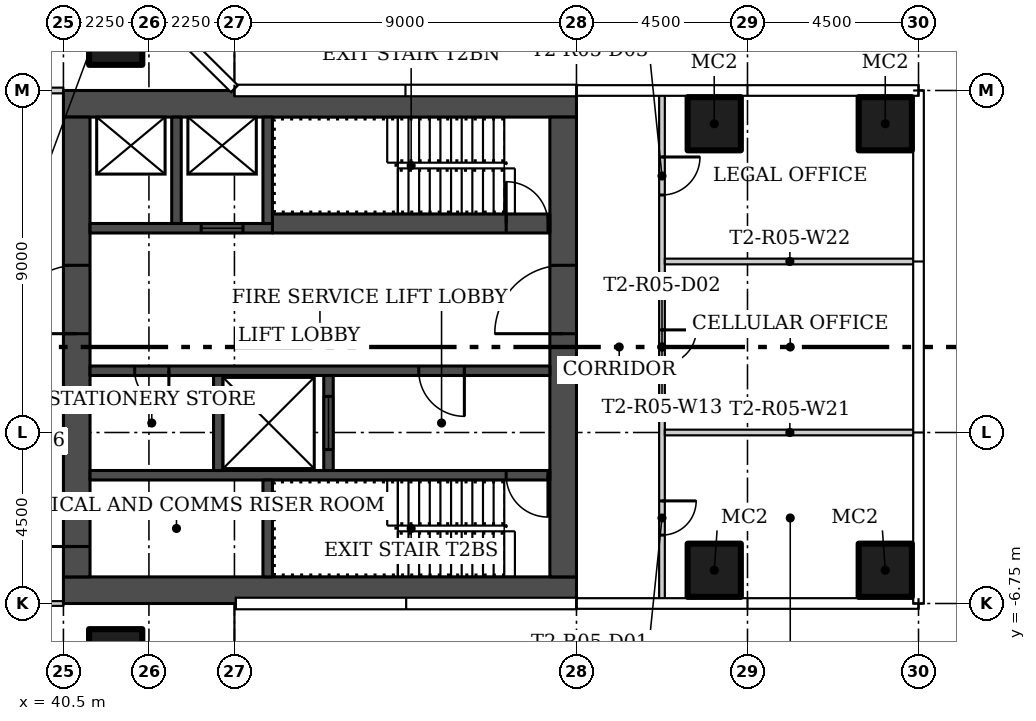
"""IFC4 building model, lengths in metres.
Left out: names, types, materials, properties, quantities, classifications, styles, units other than length and angle.
Written with IfcOpenShell. Run it as: python <this file> out.ifc"""

import sys

from ifc_helpers import new_model, si_unit, direction, frame, frame_2d, origin, origin_2d, place, context, subcontext, project, spatial, rectangle, hollow_rectangle, extrude, element, fill, save


model = new_model("IFC4")
c1 = context("Model", 3, precision=1e-05, world=origin(), true_north=direction((0.0, 1.0)))
c2 = subcontext(c1, "Body", "Model", "MODEL_VIEW")
j1 = project(units=[si_unit("LENGTHUNIT", "METRE"), si_unit("PLANEANGLEUNIT", "RADIAN")], contexts=[c1])
p1 = place(None, origin())
s1 = spatial("IfcSite", under=j1, at=p1, CompositionType="ELEMENT")
p2 = place(p1, origin())
s2 = spatial("IfcBuilding", under=s1, at=p2, CompositionType="ELEMENT")
p3 = place(p2, frame((0.0, 0.0, 57.6)))
s3 = spatial("IfcBuildingStorey", under=s2, at=p3, CompositionType="ELEMENT", Elevation=57.6)
for number, where in (
    (1, (41.875, 8.125, 0.0)),
    (2, (41.875, -8.125, 0.0)),
    (3, (57.625, -5.875, 0.0)),
    (4, (62.125, -5.875, 0.0)),
    (5, (57.625, 5.875, 0.0)),
    (6, (62.125, 5.875, 0.0)),
):
    element("IfcColumn", number, at=place(p3, frame(where)), inside=s3, PredefinedType="COLUMN", context=c2, shape_type="SweptSolid", body=[
        extrude(hollow_rectangle(XDim=1.4, YDim=1.4, WallThickness=0.05, at=origin_2d()), origin(), (0.0, 0.0, 1.0), 3.55),
    ])
p4 = place(p3, frame((35.9, 6.75, 0.0)))
e7 = element("IfcWall", 7, at=p4, inside=s3, PredefinedType="PARTITIONING", context=c2, shape_type="SweptSolid", body=[
    extrude(rectangle(XDim=4.6, YDim=0.15, at=frame_2d((2.3, 0.0))), origin(), (0.0, 0.0, 1.0), 3.55),
])
p5 = place(p4, frame((1.85, 0.0, 0.0)))
e8 = element("IfcOpeningElement", 8, at=p5, cuts=e7, PredefinedType="OPENING", context=c2, shape_type="SweptSolid", body=[
    extrude(rectangle(XDim=1.0, YDim=2.4, at=frame_2d((0.5, 1.2))), frame((0.0, 0.085, 0.0), z_axis=(0.0, -1.0, 0.0), x_axis=(1.0, 0.0, 0.0)), (0.0, 0.0, 1.0), 0.17),
])
p6 = place(p3, frame((40.5, -6.75, 0.0), z_axis=(0.0, 0.0, 1.0), x_axis=(-1.0, 0.0, 0.0)))
e9 = element("IfcWall", 9, at=p6, inside=s3, PredefinedType="PARTITIONING", context=c2, shape_type="SweptSolid", body=[
    extrude(rectangle(XDim=4.575, YDim=0.125, at=frame_2d((2.288, 0.0))), origin(), (0.0, 0.0, 1.0), 3.55),
])
p7 = place(p6, frame((1.5, 0.0, 0.0)))
e10 = element("IfcOpeningElement", 10, at=p7, cuts=e9, PredefinedType="OPENING", context=c2, shape_type="SweptSolid", body=[
    extrude(rectangle(XDim=1.5, YDim=2.1, at=frame_2d((0.75, 1.05))), frame((0.0, 0.073, 0.0), z_axis=(0.0, -1.0, 0.0), x_axis=(1.0, 0.0, 0.0)), (0.0, 0.0, 1.0), 0.145),
])
p8 = place(p3, frame((56.25, 6.655, 0.0), z_axis=(0.0, 0.0, 1.0), x_axis=(0.0, -1.0, 0.0)))
e11 = element("IfcWall", 11, at=p8, inside=s3, PredefinedType="PARTITIONING", context=c2, shape_type="SweptSolid", body=[
    extrude(rectangle(XDim=13.31, YDim=0.15, at=frame_2d((6.655, 0.0))), origin(), (0.0, 0.0, 1.0), 3.55),
])
p9 = place(p8, frame((10.705, 0.0, 0.0)))
e12 = element("IfcOpeningElement", 12, at=p9, cuts=e11, PredefinedType="OPENING", context=c2, shape_type="SweptSolid", body=[
    extrude(rectangle(XDim=0.9, YDim=2.1, at=frame_2d((0.45, 1.05))), frame((0.0, 0.085, 0.0), z_axis=(0.0, -1.0, 0.0), x_axis=(1.0, 0.0, 0.0)), (0.0, 0.0, 1.0), 0.17),
])
p10 = place(p8, frame((6.205, 0.0, 0.0)))
e13 = element("IfcOpeningElement", 13, at=p10, cuts=e11, PredefinedType="OPENING", context=c2, shape_type="SweptSolid", body=[
    extrude(rectangle(XDim=0.9, YDim=2.1, at=frame_2d((0.45, 1.05))), frame((0.0, 0.085, 0.0), z_axis=(0.0, -1.0, 0.0), x_axis=(1.0, 0.0, 0.0)), (0.0, 0.0, 1.0), 0.17),
])
p11 = place(p8, frame((1.655, 0.0, 0.0)))
e14 = element("IfcOpeningElement", 14, at=p11, cuts=e11, PredefinedType="OPENING", context=c2, shape_type="SweptSolid", body=[
    extrude(rectangle(XDim=1.0, YDim=2.4, at=frame_2d((0.5, 1.2))), frame((0.0, 0.085, 0.0), z_axis=(0.0, -1.0, 0.0), x_axis=(1.0, 0.0, 0.0)), (0.0, 0.0, 1.0), 0.17),
])
for number, where, z_axis, x_axis in (
    (15, (62.905, -2.25, 0.0), (0.0, 0.0, 1.0), (-1.0, 0.0, 0.0)),
    (16, (62.905, 2.25, 0.0), (0.0, 0.0, 1.0), (-1.0, 0.0, 0.0)),
):
    element("IfcWall", number, at=place(p3, frame(where, z_axis=z_axis, x_axis=x_axis)), inside=s3, PredefinedType="PARTITIONING", context=c2, shape_type="SweptSolid", body=[
        extrude(rectangle(XDim=6.58, YDim=0.15, at=frame_2d((3.29, 0.0))), origin(), (0.0, 0.0, 1.0), 3.55),
    ])
for number, where, z_axis, x_axis in (
    (17, (54.0, -6.4, 0.0), (0.0, 0.0, 1.0), (-1.0, 0.0, 0.0)),
    (18, (54.0, 6.4, 0.0), (0.0, 0.0, 1.0), (-1.0, 0.0, 0.0)),
):
    element("IfcWall", number, at=place(p3, frame(where, z_axis=z_axis, x_axis=x_axis)), inside=s3, PredefinedType="SHEAR", context=c2, shape_type="SweptSolid", body=[
        extrude(rectangle(XDim=13.5, YDim=0.7, at=frame_2d((6.75, 0.0))), origin(), (0.0, 0.0, 1.0), 3.55),
    ])
p12 = place(p3, frame((53.65, -6.05, 0.0), z_axis=(0.0, 0.0, 1.0), x_axis=(0.0, 1.0, 0.0)))
e19 = element("IfcWall", 19, at=p12, inside=s3, PredefinedType="SHEAR", context=c2, shape_type="SweptSolid", body=[
    extrude(rectangle(XDim=12.1, YDim=0.7, at=frame_2d((6.05, 0.0))), origin(), (0.0, 0.0, 1.0), 3.55),
])
p13 = place(p12, frame((6.4, 0.0, 0.0)))
e20 = element("IfcOpeningElement", 20, at=p13, cuts=e19, PredefinedType="OPENING", context=c2, shape_type="SweptSolid", body=[
    extrude(rectangle(XDim=1.8, YDim=2.4, at=frame_2d((0.9, 1.2))), frame((0.0, 0.36, 0.0), z_axis=(0.0, -1.0, 0.0), x_axis=(1.0, 0.0, 0.0)), (0.0, 0.0, 1.0), 0.72),
])
p14 = place(p3, frame((40.85, -6.05, 0.0), z_axis=(0.0, 0.0, 1.0), x_axis=(0.0, 1.0, 0.0)))
e21 = element("IfcWall", 21, at=p14, inside=s3, PredefinedType="SHEAR", context=c2, shape_type="SweptSolid", body=[
    extrude(rectangle(XDim=12.1, YDim=0.7, at=frame_2d((6.05, 0.0))), origin(), (0.0, 0.0, 1.0), 3.55),
])
p15 = place(p14, frame((0.8, 0.0, 0.0)))
e22 = element("IfcOpeningElement", 22, at=p15, cuts=e21, PredefinedType="OPENING", context=c2, shape_type="SweptSolid", body=[
    extrude(rectangle(XDim=1.2, YDim=2.1, at=frame_2d((0.6, 1.05))), frame((0.0, 0.36, 0.0), z_axis=(0.0, -1.0, 0.0), x_axis=(1.0, 0.0, 0.0)), (0.0, 0.0, 1.0), 0.72),
])
p16 = place(p14, frame((6.4, 0.0, 0.0)))
e23 = element("IfcOpeningElement", 23, at=p16, cuts=e21, PredefinedType="OPENING", context=c2, shape_type="SweptSolid", body=[
    extrude(rectangle(XDim=1.8, YDim=2.4, at=frame_2d((0.9, 1.2))), frame((0.0, 0.36, 0.0), z_axis=(0.0, -1.0, 0.0), x_axis=(1.0, 0.0, 0.0)), (0.0, 0.0, 1.0), 0.72),
])
p17 = place(p3, frame((53.3, -3.375, 0.0), z_axis=(0.0, 0.0, 1.0), x_axis=(-1.0, 0.0, 0.0)))
e24 = element("IfcWall", 24, at=p17, inside=s3, PredefinedType="SHEAR", context=c2, shape_type="SweptSolid", body=[
    extrude(rectangle(XDim=12.1, YDim=0.25, at=frame_2d((6.05, 0.0))), origin(), (0.0, 0.0, 1.0), 3.55),
])
p18 = place(p17, frame((0.05, 0.0, 0.0)))
e25 = element("IfcOpeningElement", 25, at=p18, cuts=e24, PredefinedType="OPENING", context=c2, shape_type="SweptSolid", body=[
    extrude(rectangle(XDim=1.1, YDim=2.1, at=frame_2d((0.55, 1.05))), frame((0.0, 0.135, 0.0), z_axis=(0.0, -1.0, 0.0), x_axis=(1.0, 0.0, 0.0)), (0.0, 0.0, 1.0), 0.27),
])
p19 = place(p3, frame((45.875, -6.05, 0.0), z_axis=(0.0, 0.0, 1.0), x_axis=(0.0, 1.0, 0.0)))
e26 = element("IfcWall", 26, at=p19, inside=s3, PredefinedType="SHEAR", context=c2, shape_type="SweptSolid", body=[
    extrude(rectangle(XDim=2.55, YDim=0.25, at=frame_2d((1.275, 0.0))), origin(), (0.0, 0.0, 1.0), 3.55),
])
p20 = place(p3, frame((53.3, -0.625, 0.0), z_axis=(0.0, 0.0, 1.0), x_axis=(-1.0, 0.0, 0.0)))
e27 = element("IfcWall", 27, at=p20, inside=s3, PredefinedType="SHEAR", context=c2, shape_type="SweptSolid", body=[
    extrude(rectangle(XDim=12.1, YDim=0.25, at=frame_2d((6.05, 0.0))), origin(), (0.0, 0.0, 1.0), 3.55),
])
p21 = place(p20, frame((2.25, 0.0, 0.0)))
e28 = element("IfcOpeningElement", 28, at=p21, cuts=e27, PredefinedType="OPENING", context=c2, shape_type="SweptSolid", body=[
    extrude(rectangle(XDim=1.2, YDim=2.1, at=frame_2d((0.6, 1.05))), frame((0.0, 0.135, 0.0), z_axis=(0.0, -1.0, 0.0), x_axis=(1.0, 0.0, 0.0)), (0.0, 0.0, 1.0), 0.27),
])
p22 = place(p20, frame((10.025, 0.0, 0.0)))
e29 = element("IfcOpeningElement", 29, at=p22, cuts=e27, PredefinedType="OPENING", context=c2, shape_type="SweptSolid", body=[
    extrude(rectangle(XDim=0.9, YDim=2.1, at=frame_2d((0.45, 1.05))), frame((0.0, 0.135, 0.0), z_axis=(0.0, -1.0, 0.0), x_axis=(1.0, 0.0, 0.0)), (0.0, 0.0, 1.0), 0.27),
])
p23 = place(p3, frame((47.475, -3.25, 0.0), z_axis=(0.0, 0.0, 1.0), x_axis=(0.0, 1.0, 0.0)))
e30 = element("IfcWall", 30, at=p23, inside=s3, PredefinedType="SHEAR", context=c2, shape_type="SweptSolid", body=[
    extrude(rectangle(XDim=2.5, YDim=0.25, at=frame_2d((1.25, 0.0))), origin(), (0.0, 0.0, 1.0), 3.55),
])
p24 = place(p23, frame((0.55, 0.0, 0.0)))
e31 = element("IfcOpeningElement", 31, at=p24, cuts=e30, PredefinedType="OPENING", context=c2, shape_type="SweptSolid", body=[
    extrude(rectangle(XDim=1.4, YDim=2.4, at=frame_2d((0.7, 1.2))), frame((0.0, 0.135, 0.0), z_axis=(0.0, -1.0, 0.0), x_axis=(1.0, 0.0, 0.0)), (0.0, 0.0, 1.0), 0.27),
])
p25 = place(p3, frame((44.575, -3.25, 0.0), z_axis=(0.0, 0.0, 1.0), x_axis=(0.0, 1.0, 0.0)))
e32 = element("IfcWall", 32, at=p25, inside=s3, PredefinedType="SHEAR", context=c2, shape_type="SweptSolid", body=[
    extrude(rectangle(XDim=2.5, YDim=0.25, at=frame_2d((1.25, 0.0))), origin(), (0.0, 0.0, 1.0), 3.55),
])
p26 = place(p3, frame((46.0, 3.25, 0.0)))
e33 = element("IfcWall", 33, at=p26, inside=s3, PredefinedType="SHEAR", context=c2, shape_type="SweptSolid", body=[
    extrude(rectangle(XDim=7.3, YDim=0.5, at=frame_2d((3.65, 0.0))), origin(), (0.0, 0.0, 1.0), 3.55),
])
p27 = place(p26, frame((6.15, 0.0, 0.0)))
e34 = element("IfcOpeningElement", 34, at=p27, cuts=e33, PredefinedType="OPENING", context=c2, shape_type="SweptSolid", body=[
    extrude(rectangle(XDim=1.1, YDim=2.1, at=frame_2d((0.55, 1.05))), frame((0.0, 0.26, 0.0), z_axis=(0.0, -1.0, 0.0), x_axis=(1.0, 0.0, 0.0)), (0.0, 0.0, 1.0), 0.52),
])
p28 = place(p3, frame((46.0, 3.125, 0.0), z_axis=(0.0, 0.0, 1.0), x_axis=(-1.0, 0.0, 0.0)))
e35 = element("IfcWall", 35, at=p28, inside=s3, PredefinedType="SHEAR", context=c2, shape_type="SweptSolid", body=[
    extrude(rectangle(XDim=4.8, YDim=0.25, at=frame_2d((2.4, 0.0))), origin(), (0.0, 0.0, 1.0), 3.55),
])
p29 = place(p28, frame((0.775, 0.0, 0.0)))
e36 = element("IfcOpeningElement", 36, at=p29, cuts=e35, PredefinedType="OPENING", context=c2, shape_type="SweptSolid", body=[
    extrude(rectangle(XDim=1.1, YDim=2.1, at=frame_2d((0.55, 1.05))), frame((0.0, 0.135, 0.0), z_axis=(0.0, -1.0, 0.0), x_axis=(1.0, 0.0, 0.0)), (0.0, 0.0, 1.0), 0.27),
])
for number, where, z_axis, x_axis in (
    (37, (45.875, 3.25, 0.0), (0.0, 0.0, 1.0), (0.0, 1.0, 0.0)),
    (38, (43.475, 3.25, 0.0), (0.0, 0.0, 1.0), (0.0, 1.0, 0.0)),
):
    element("IfcWall", number, at=place(p3, frame(where, z_axis=z_axis, x_axis=x_axis)), inside=s3, PredefinedType="SHEAR", context=c2, shape_type="SweptSolid", body=[
        extrude(rectangle(XDim=2.8, YDim=0.25, at=frame_2d((1.4, 0.0))), origin(), (0.0, 0.0, 1.0), 3.55),
    ])
p30 = place(p9, origin())
e39 = element("IfcDoor", 39, at=p30, inside=s3, OperationType="SINGLE_SWING_LEFT", PredefinedType="DOOR", context=c2, shape_type="SweptSolid", body=[
    extrude(rectangle(XDim=0.9, YDim=2.1, at=frame_2d((0.45, 1.05))), frame((0.0, 0.025, 0.0), z_axis=(0.0, -1.0, 0.0), x_axis=(1.0, 0.0, 0.0)), (0.0, 0.0, 1.0), 0.05),
])
fill(e12, e39)
p31 = place(p10, origin())
e40 = element("IfcDoor", 40, at=p31, inside=s3, OperationType="SINGLE_SWING_RIGHT", PredefinedType="DOOR", context=c2, shape_type="SweptSolid", body=[
    extrude(rectangle(XDim=0.9, YDim=2.1, at=frame_2d((0.45, 1.05))), frame((0.0, 0.025, 0.0), z_axis=(0.0, -1.0, 0.0), x_axis=(1.0, 0.0, 0.0)), (0.0, 0.0, 1.0), 0.05),
])
fill(e13, e40)
p32 = place(p11, origin())
e41 = element("IfcDoor", 41, at=p32, inside=s3, OperationType="SINGLE_SWING_RIGHT", PredefinedType="DOOR", context=c2, shape_type="SweptSolid", body=[
    extrude(rectangle(XDim=1.0, YDim=2.4, at=frame_2d((0.5, 1.2))), frame((0.0, 0.025, 0.0), z_axis=(0.0, -1.0, 0.0), x_axis=(1.0, 0.0, 0.0)), (0.0, 0.0, 1.0), 0.05),
])
fill(e14, e41)
p33 = place(p13, origin())
e42 = element("IfcDoor", 42, at=p33, inside=s3, OperationType="DOUBLE_DOOR_SINGLE_SWING", PredefinedType="DOOR", context=c2, shape_type="SweptSolid", body=[
    extrude(rectangle(XDim=1.8, YDim=2.4, at=frame_2d((0.9, 1.2))), frame((0.0, 0.025, 0.0), z_axis=(0.0, -1.0, 0.0), x_axis=(1.0, 0.0, 0.0)), (0.0, 0.0, 1.0), 0.05),
])
fill(e20, e42)
p34 = place(p15, origin())
e43 = element("IfcDoor", 43, at=p34, inside=s3, OperationType="SINGLE_SWING_LEFT", PredefinedType="DOOR", context=c2, shape_type="SweptSolid", body=[
    extrude(rectangle(XDim=1.2, YDim=2.1, at=frame_2d((0.6, 1.05))), frame((0.0, 0.025, 0.0), z_axis=(0.0, -1.0, 0.0), x_axis=(1.0, 0.0, 0.0)), (0.0, 0.0, 1.0), 0.05),
])
fill(e22, e43)
p35 = place(p16, origin())
e44 = element("IfcDoor", 44, at=p35, inside=s3, OperationType="DOUBLE_DOOR_SINGLE_SWING", PredefinedType="DOOR", context=c2, shape_type="SweptSolid", body=[
    extrude(rectangle(XDim=1.8, YDim=2.4, at=frame_2d((0.9, 1.2))), frame((0.0, 0.025, 0.0), z_axis=(0.0, -1.0, 0.0), x_axis=(1.0, 0.0, 0.0)), (0.0, 0.0, 1.0), 0.05),
])
fill(e23, e44)
p36 = place(p18, origin())
e45 = element("IfcDoor", 45, at=p36, inside=s3, OperationType="SINGLE_SWING_LEFT", PredefinedType="DOOR", context=c2, shape_type="SweptSolid", body=[
    extrude(rectangle(XDim=1.1, YDim=2.1, at=frame_2d((0.55, 1.05))), frame((0.0, 0.025, 0.0), z_axis=(0.0, -1.0, 0.0), x_axis=(1.0, 0.0, 0.0)), (0.0, 0.0, 1.0), 0.05),
])
fill(e25, e45)
p37 = place(p21, origin())
e46 = element("IfcDoor", 46, at=p37, inside=s3, OperationType="SINGLE_SWING_LEFT", PredefinedType="DOOR", context=c2, shape_type="SweptSolid", body=[
    extrude(rectangle(XDim=1.2, YDim=2.1, at=frame_2d((0.6, 1.05))), frame((0.0, 0.025, 0.0), z_axis=(0.0, -1.0, 0.0), x_axis=(1.0, 0.0, 0.0)), (0.0, 0.0, 1.0), 0.05),
])
fill(e28, e46)
p38 = place(p22, origin())
e47 = element("IfcDoor", 47, at=p38, inside=s3, OperationType="SINGLE_SWING_RIGHT", PredefinedType="DOOR", context=c2, shape_type="SweptSolid", body=[
    extrude(rectangle(XDim=0.9, YDim=2.1, at=frame_2d((0.45, 1.05))), frame((0.0, 0.025, 0.0), z_axis=(0.0, -1.0, 0.0), x_axis=(1.0, 0.0, 0.0)), (0.0, 0.0, 1.0), 0.05),
])
fill(e29, e47)
p39 = place(p24, origin())
e48 = element("IfcDoor", 48, at=p39, inside=s3, OperationType="SLIDING_TO_LEFT", PredefinedType="DOOR", context=c2, shape_type="SweptSolid", body=[
    extrude(rectangle(XDim=1.4, YDim=2.4, at=frame_2d((0.7, 1.2))), frame((0.0, 0.025, 0.0), z_axis=(0.0, -1.0, 0.0), x_axis=(1.0, 0.0, 0.0)), (0.0, 0.0, 1.0), 0.05),
])
fill(e31, e48)
p40 = place(p27, origin())
e49 = element("IfcDoor", 49, at=p40, inside=s3, OperationType="SINGLE_SWING_RIGHT", PredefinedType="DOOR", context=c2, shape_type="SweptSolid", body=[
    extrude(rectangle(XDim=1.1, YDim=2.1, at=frame_2d((0.55, 1.05))), frame((0.0, 0.025, 0.0), z_axis=(0.0, -1.0, 0.0), x_axis=(1.0, 0.0, 0.0)), (0.0, 0.0, 1.0), 0.05),
])
fill(e34, e49)
p41 = place(p29, origin())
e50 = element("IfcDoor", 50, at=p41, inside=s3, OperationType="SLIDING_TO_LEFT", PredefinedType="DOOR", context=c2, shape_type="SweptSolid", body=[
    extrude(rectangle(XDim=1.1, YDim=2.1, at=frame_2d((0.55, 1.05))), frame((0.0, 0.025, 0.0), z_axis=(0.0, -1.0, 0.0), x_axis=(1.0, 0.0, 0.0)), (0.0, 0.0, 1.0), 0.05),
])
fill(e36, e50)
save(model, sys.argv[1])
